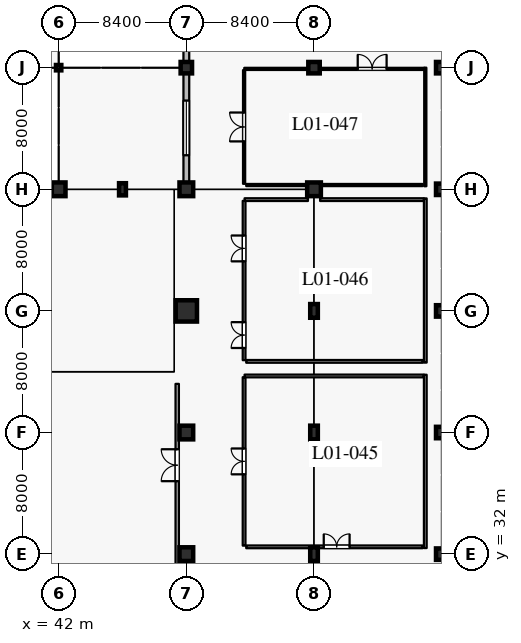
"""IFC4 building model, lengths in metres.
Left out: names, types, materials, properties, quantities, classifications, styles, units other than length and angle.
Written with IfcOpenShell. Run it as: python <this file> out.ifc"""

import sys

from ifc_helpers import new_model, si_unit, direction, frame, frame_2d, origin, origin_2d, place, context, subcontext, project, spatial, rectangle, hollow_rectangle, circle, extrude, element, fill, save


model = new_model("IFC4")
c1 = context("Model", 3, precision=1e-05, world=origin(), true_north=direction((0.0, 1.0)))
c2 = subcontext(c1, "Body", "Model", "MODEL_VIEW")
j1 = project(units=[si_unit("LENGTHUNIT", "METRE"), si_unit("PLANEANGLEUNIT", "RADIAN")], contexts=[c1])
p1 = place(None, origin())
s1 = spatial("IfcSite", under=j1, at=p1, CompositionType="ELEMENT")
p2 = place(p1, origin())
s2 = spatial("IfcBuilding", under=s1, at=p2, CompositionType="ELEMENT")
p3 = place(p2, frame((0.0, 0.0, 6.0)))
s3 = spatial("IfcBuildingStorey", under=s2, at=p3, CompositionType="ELEMENT", Elevation=6.0)
p4 = place(p3, frame((42.0, 56.0, 0.0), z_axis=(0.0, 0.0, 1.0), x_axis=(1.0, 0.0, 0.0)))
e1 = element("IfcColumn", 1, at=p4, inside=s3, PredefinedType="COLUMN", context=c2, shape_type="SweptSolid", body=[
    extrude(rectangle(XDim=0.9, YDim=0.9, at=origin_2d()), origin(), (0.0, 0.0, 1.0), 5.4),
])
p5 = place(p3, frame((42.0, 64.0, 0.0), z_axis=(0.0, 0.0, 1.0), x_axis=(1.0, 0.0, 0.0)))
e2 = element("IfcColumn", 2, at=p5, inside=s3, PredefinedType="COLUMN", context=c2, shape_type="SweptSolid", body=[
    extrude(hollow_rectangle(XDim=0.35, YDim=0.35, WallThickness=0.016, at=origin_2d()), origin(), (0.0, 0.0, 1.0), 5.4),
])
p6 = place(p3, frame((46.2, 56.0, 0.0), z_axis=(0.0, 0.0, 1.0), x_axis=(1.0, 0.0, 0.0)))
e3 = element("IfcColumn", 3, at=p6, inside=s3, PredefinedType="PILASTER", context=c2, shape_type="SweptSolid", body=[
    extrude(rectangle(XDim=0.45, YDim=0.8, at=origin_2d()), origin(), (0.0, 0.0, 1.0), 5.4),
])
for number, where, z_axis, x_axis in (
    (4, (50.4, 32.0, 0.0), (0.0, 0.0, 1.0), (1.0, 0.0, 0.0)),
    (5, (50.4, 40.0, 0.0), (0.0, 0.0, 1.0), (1.0, 0.0, 0.0)),
):
    element("IfcColumn", number, at=place(p3, frame(where, z_axis=z_axis, x_axis=x_axis)), inside=s3, PredefinedType="COLUMN", context=c2, shape_type="SweptSolid", body=[
        extrude(rectangle(XDim=0.9, YDim=0.9, at=origin_2d()), origin(), (0.0, 0.0, 1.0), 5.4),
    ])
p7 = place(p3, frame((50.4, 48.0, 0.0), z_axis=(0.0, 0.0, 1.0), x_axis=(1.0, 0.0, 0.0)))
e6 = element("IfcColumn", 6, at=p7, inside=s3, PredefinedType="COLUMN", context=c2, shape_type="SweptSolid", body=[
    extrude(circle(Radius=0.7, at=origin_2d()), origin(), (0.0, 0.0, 1.0), 5.4),
])
p8 = place(p3, frame((50.4, 56.0, 0.0), z_axis=(0.0, 0.0, 1.0), x_axis=(1.0, 0.0, 0.0)))
e7 = element("IfcColumn", 7, at=p8, inside=s3, PredefinedType="COLUMN", context=c2, shape_type="SweptSolid", body=[
    extrude(rectangle(XDim=0.9, YDim=0.9, at=origin_2d()), origin(), (0.0, 0.0, 1.0), 5.4),
])
p9 = place(p3, frame((50.4, 64.0, 0.0), z_axis=(0.0, 0.0, 1.0), x_axis=(1.0, 0.0, 0.0)))
e8 = element("IfcColumn", 8, at=p9, inside=s3, PredefinedType="COLUMN", context=c2, shape_type="SweptSolid", body=[
    extrude(rectangle(XDim=0.75, YDim=0.75, at=origin_2d()), origin(), (0.0, 0.0, 1.0), 5.4),
])
for number, where, z_axis, x_axis in (
    (9, (58.8, 32.0, 0.0), (0.0, 0.0, 1.0), (1.0, 0.0, 0.0)),
    (10, (58.8, 40.0, 0.0), (0.0, 0.0, 1.0), (1.0, 0.0, 0.0)),
    (11, (58.8, 48.0, 0.0), (0.0, 0.0, 1.0), (1.0, 0.0, 0.0)),
):
    element("IfcColumn", number, at=place(p3, frame(where, z_axis=z_axis, x_axis=x_axis)), inside=s3, PredefinedType="COLUMN", context=c2, shape_type="SweptSolid", body=[
        extrude(hollow_rectangle(XDim=0.5, YDim=0.9, WallThickness=0.024, at=origin_2d()), origin(), (0.0, 0.0, 1.0), 5.4),
    ])
p10 = place(p3, frame((58.8, 56.0, 0.0), z_axis=(0.0, 0.0, 1.0), x_axis=(1.0, 0.0, 0.0)))
e12 = element("IfcColumn", 12, at=p10, inside=s3, PredefinedType="COLUMN", context=c2, shape_type="SweptSolid", body=[
    extrude(rectangle(XDim=0.9, YDim=0.9, at=origin_2d()), origin(), (0.0, 0.0, 1.0), 5.4),
])
for number, where, z_axis, x_axis in (
    (13, (58.8, 64.0, 0.0), (0.0, 0.0, 1.0), (1.0, 0.0, 0.0)),
    (14, (67.2, 32.0, 0.0), (0.0, 0.0, 1.0), (1.0, 0.0, 0.0)),
    (15, (67.2, 40.0, 0.0), (0.0, 0.0, 1.0), (1.0, 0.0, 0.0)),
    (16, (67.2, 48.0, 0.0), (0.0, 0.0, 1.0), (1.0, 0.0, 0.0)),
    (17, (67.2, 56.0, 0.0), (0.0, 0.0, 1.0), (1.0, 0.0, 0.0)),
    (18, (67.2, 64.0, 0.0), (0.0, 0.0, 1.0), (1.0, 0.0, 0.0)),
):
    element("IfcColumn", number, at=place(p3, frame(where, z_axis=z_axis, x_axis=x_axis)), inside=s3, PredefinedType="COLUMN", context=c2, shape_type="SweptSolid", body=[
        extrude(rectangle(XDim=0.75, YDim=0.75, at=origin_2d()), origin(), (0.0, 0.0, 1.0), 5.4),
    ])
p11 = place(p3, frame((50.4, 56.45, 0.0), z_axis=(0.0, 0.0, 1.0), x_axis=(0.0, 1.0, 0.0)))
e19 = element("IfcWall", 19, at=p11, inside=s3, PredefinedType="SOLIDWALL", context=c2, shape_type="SweptSolid", body=[
    extrude(rectangle(XDim=7.175, YDim=0.38, at=frame_2d((3.587, 0.0))), origin(), (0.0, 0.0, 1.0), 4.67),
])
p12 = place(p11, frame((1.787, 0.0, 0.9)))
e20 = element("IfcOpeningElement", 20, at=p12, cuts=e19, PredefinedType="OPENING", context=c2, shape_type="SweptSolid", body=[
    extrude(rectangle(XDim=3.6, YDim=2.5, at=frame_2d((1.8, 1.25))), frame((0.0, 0.2, 0.0), z_axis=(0.0, -1.0, 0.0), x_axis=(1.0, 0.0, 0.0)), (0.0, 0.0, 1.0), 0.4),
])
p13 = place(p3, frame((50.4, 64.375, 0.0), z_axis=(0.0, 0.0, 1.0), x_axis=(0.0, 1.0, 0.0)))
e21 = element("IfcWall", 21, at=p13, inside=s3, PredefinedType="SOLIDWALL", context=c2, shape_type="SweptSolid", body=[
    extrude(rectangle(XDim=7.25, YDim=0.38, at=frame_2d((3.625, 0.0))), origin(), (0.0, 0.0, 1.0), 5.1),
])
p14 = place(p13, frame((1.825, 0.0, 0.9)))
e22 = element("IfcOpeningElement", 22, at=p14, cuts=e21, PredefinedType="OPENING", context=c2, shape_type="SweptSolid", body=[
    extrude(rectangle(XDim=3.6, YDim=2.5, at=frame_2d((1.8, 1.25))), frame((0.0, 0.2, 0.0), z_axis=(0.0, -1.0, 0.0), x_axis=(1.0, 0.0, 0.0)), (0.0, 0.0, 1.0), 0.4),
])
p15 = place(p3, frame((49.8, 9.2, 0.0), z_axis=(0.0, 0.0, 1.0), x_axis=(0.0, 1.0, 0.0)))
e23 = element("IfcWall", 23, at=p15, inside=s3, PredefinedType="PARTITIONING", context=c2, shape_type="SweptSolid", body=[
    extrude(rectangle(XDim=34.0, YDim=0.22, at=frame_2d((17.0, 0.0))), origin(), (0.0, 0.0, 1.0), 5.045),
])
p16 = place(p15, frame((1.75, 0.0, 0.0)))
e24 = element("IfcOpeningElement", 24, at=p16, cuts=e23, PredefinedType="OPENING", context=c2, shape_type="SweptSolid", body=[
    extrude(rectangle(XDim=2.1, YDim=2.5, at=frame_2d((1.05, 1.25))), frame((0.0, 0.12, 0.0), z_axis=(0.0, -1.0, 0.0), x_axis=(1.0, 0.0, 0.0)), (0.0, 0.0, 1.0), 0.24),
])
p17 = place(p15, frame((15.8, 0.0, 0.0)))
e25 = element("IfcOpeningElement", 25, at=p17, cuts=e23, PredefinedType="OPENING", context=c2, shape_type="SweptSolid", body=[
    extrude(rectangle(XDim=2.1, YDim=2.5, at=frame_2d((1.05, 1.25))), frame((0.0, 0.12, 0.0), z_axis=(0.0, -1.0, 0.0), x_axis=(1.0, 0.0, 0.0)), (0.0, 0.0, 1.0), 0.24),
])
p18 = place(p15, frame((27.6, 0.0, 0.0)))
e26 = element("IfcOpeningElement", 26, at=p18, cuts=e23, PredefinedType="OPENING", context=c2, shape_type="SweptSolid", body=[
    extrude(rectangle(XDim=2.1, YDim=2.5, at=frame_2d((1.05, 1.25))), frame((0.0, 0.12, 0.0), z_axis=(0.0, -1.0, 0.0), x_axis=(1.0, 0.0, 0.0)), (0.0, 0.0, 1.0), 0.24),
])
p19 = place(p3, frame((54.2, 32.56, 0.0), z_axis=(0.0, 0.0, 1.0), x_axis=(0.0, 1.0, 0.0)))
e27 = element("IfcWall", 27, at=p19, inside=s3, PredefinedType="PARTITIONING", context=c2, shape_type="SweptSolid", body=[
    extrude(rectangle(XDim=11.08, YDim=0.18, at=frame_2d((5.54, 0.0))), origin(), (0.0, 0.0, 1.0), 5.045),
])
p20 = place(p19, frame((4.69, 0.0, 0.0)))
e28 = element("IfcOpeningElement", 28, at=p20, cuts=e27, PredefinedType="OPENING", context=c2, shape_type="SweptSolid", body=[
    extrude(rectangle(XDim=1.7, YDim=2.3, at=frame_2d((0.85, 1.15))), frame((0.0, 0.1, 0.0), z_axis=(0.0, -1.0, 0.0), x_axis=(1.0, 0.0, 0.0)), (0.0, 0.0, 1.0), 0.2),
])
p21 = place(p3, frame((54.34, 32.48, 0.0), z_axis=(0.0, 0.0, 1.0), x_axis=(1.0, 0.0, 0.0)))
e29 = element("IfcWall", 29, at=p21, inside=s3, PredefinedType="PARTITIONING", context=c2, shape_type="SweptSolid", body=[
    extrude(rectangle(XDim=11.61, YDim=0.18, at=frame_2d((5.805, 0.0))), origin(), (0.0, 0.0, 1.0), 5.045),
])
p22 = place(p21, frame((5.1, 0.0, 0.0)))
e30 = element("IfcOpeningElement", 30, at=p22, cuts=e29, PredefinedType="OPENING", context=c2, shape_type="SweptSolid", body=[
    extrude(rectangle(XDim=1.7, YDim=2.3, at=frame_2d((0.85, 1.15))), frame((0.0, 0.1, 0.0), z_axis=(0.0, -1.0, 0.0), x_axis=(1.0, 0.0, 0.0)), (0.0, 0.0, 1.0), 0.2),
])
p23 = place(p3, frame((54.2, 44.76, 0.0), z_axis=(0.0, 0.0, 1.0), x_axis=(0.0, 1.0, 0.0)))
e31 = element("IfcWall", 31, at=p23, inside=s3, PredefinedType="PARTITIONING", context=c2, shape_type="SweptSolid", body=[
    extrude(rectangle(XDim=10.48, YDim=0.18, at=frame_2d((5.24, 0.0))), origin(), (0.0, 0.0, 1.0), 5.045),
])
p24 = place(p23, frame((0.8, 0.0, 0.0)))
e32 = element("IfcOpeningElement", 32, at=p24, cuts=e31, PredefinedType="OPENING", context=c2, shape_type="SweptSolid", body=[
    extrude(rectangle(XDim=1.7, YDim=2.3, at=frame_2d((0.85, 1.15))), frame((0.0, 0.1, 0.0), z_axis=(0.0, -1.0, 0.0), x_axis=(1.0, 0.0, 0.0)), (0.0, 0.0, 1.0), 0.2),
])
p25 = place(p23, frame((6.5, 0.0, 0.0)))
e33 = element("IfcOpeningElement", 33, at=p25, cuts=e31, PredefinedType="OPENING", context=c2, shape_type="SweptSolid", body=[
    extrude(rectangle(XDim=1.7, YDim=2.3, at=frame_2d((0.85, 1.15))), frame((0.0, 0.1, 0.0), z_axis=(0.0, -1.0, 0.0), x_axis=(1.0, 0.0, 0.0)), (0.0, 0.0, 1.0), 0.2),
])
p26 = place(p3, frame((54.34, 44.68, 0.0), z_axis=(0.0, 0.0, 1.0), x_axis=(1.0, 0.0, 0.0)))
e34 = element("IfcWall", 34, at=p26, inside=s3, PredefinedType="PARTITIONING", context=c2, shape_type="SweptSolid", body=[
    extrude(rectangle(XDim=11.61, YDim=0.18, at=frame_2d((5.805, 0.0))), origin(), (0.0, 0.0, 1.0), 5.045),
])
p27 = place(p3, frame((54.2, 56.36, 0.0), z_axis=(0.0, 0.0, 1.0), x_axis=(0.0, 1.0, 0.0)))
e35 = element("IfcWall", 35, at=p27, inside=s3, PredefinedType="PARTITIONING", context=c2, shape_type="SweptSolid", body=[
    extrude(rectangle(XDim=7.48, YDim=0.14, at=frame_2d((3.74, 0.0))), origin(), (0.0, 0.0, 1.0), 5.045),
])
p28 = place(p27, frame((2.79, 0.0, 0.0)))
e36 = element("IfcOpeningElement", 36, at=p28, cuts=e35, PredefinedType="OPENING", context=c2, shape_type="SweptSolid", body=[
    extrude(rectangle(XDim=1.9, YDim=2.4, at=frame_2d((0.95, 1.2))), frame((0.0, 0.08, 0.0), z_axis=(0.0, -1.0, 0.0), x_axis=(1.0, 0.0, 0.0)), (0.0, 0.0, 1.0), 0.16),
])
p29 = place(p3, frame((54.34, 56.28, 0.0), z_axis=(0.0, 0.0, 1.0), x_axis=(1.0, 0.0, 0.0)))
e37 = element("IfcWall", 37, at=p29, inside=s3, PredefinedType="PARTITIONING", context=c2, shape_type="SweptSolid", body=[
    extrude(rectangle(XDim=11.61, YDim=0.14, at=frame_2d((5.805, 0.0))), origin(), (0.0, 0.0, 1.0), 5.045),
])
p30 = place(p3, frame((66.12, 32.4, 0.0), z_axis=(0.0, 0.0, 1.0), x_axis=(0.0, 1.0, 0.0)))
e38 = element("IfcWall", 38, at=p30, inside=s3, PredefinedType="PARTITIONING", context=c2, shape_type="SweptSolid", body=[
    extrude(rectangle(XDim=11.4, YDim=0.18, at=frame_2d((5.7, 0.0))), origin(), (0.0, 0.0, 1.0), 5.045),
])
p31 = place(p3, frame((54.232, 43.72, 0.0), z_axis=(0.0, 0.0, 1.0), x_axis=(1.0, 0.0, 0.0)))
e39 = element("IfcWall", 39, at=p31, inside=s3, PredefinedType="PARTITIONING", context=c2, shape_type="SweptSolid", body=[
    extrude(rectangle(XDim=11.798, YDim=0.18, at=frame_2d((5.899, 0.0))), origin(), (0.0, 0.0, 1.0), 5.045),
])
p32 = place(p3, frame((66.12, 44.6, 0.0), z_axis=(0.0, 0.0, 1.0), x_axis=(0.0, 1.0, 0.0)))
e40 = element("IfcWall", 40, at=p32, inside=s3, PredefinedType="PARTITIONING", context=c2, shape_type="SweptSolid", body=[
    extrude(rectangle(XDim=10.8, YDim=0.18, at=frame_2d((5.4, 0.0))), origin(), (0.0, 0.0, 1.0), 5.045),
])
p33 = place(p3, frame((54.232, 55.32, 0.0), z_axis=(0.0, 0.0, 1.0), x_axis=(1.0, 0.0, 0.0)))
e41 = element("IfcWall", 41, at=p33, inside=s3, PredefinedType="PARTITIONING", context=c2, shape_type="SweptSolid", body=[
    extrude(rectangle(XDim=4.168, YDim=0.18, at=frame_2d((2.084, 0.0))), origin(), (0.0, 0.0, 1.0), 5.045),
])
p34 = place(p3, frame((59.2, 55.32, 0.0), z_axis=(0.0, 0.0, 1.0), x_axis=(1.0, 0.0, 0.0)))
e42 = element("IfcWall", 42, at=p34, inside=s3, PredefinedType="PARTITIONING", context=c2, shape_type="SweptSolid", body=[
    extrude(rectangle(XDim=6.83, YDim=0.18, at=frame_2d((3.415, 0.0))), origin(), (0.0, 0.0, 1.0), 5.045),
])
p35 = place(p3, frame((66.12, 56.2, 0.0), z_axis=(0.0, 0.0, 1.0), x_axis=(0.0, 1.0, 0.0)))
e43 = element("IfcWall", 43, at=p35, inside=s3, PredefinedType="PARTITIONING", context=c2, shape_type="SweptSolid", body=[
    extrude(rectangle(XDim=7.8, YDim=0.14, at=frame_2d((3.9, 0.0))), origin(), (0.0, 0.0, 1.0), 5.045),
])
p36 = place(p3, frame((54.212, 63.92, 0.0), z_axis=(0.0, 0.0, 1.0), x_axis=(1.0, 0.0, 0.0)))
e44 = element("IfcWall", 44, at=p36, inside=s3, PredefinedType="PARTITIONING", context=c2, shape_type="SweptSolid", body=[
    extrude(rectangle(XDim=4.213, YDim=0.14, at=frame_2d((2.106, 0.0))), origin(), (0.0, 0.0, 1.0), 5.045),
])
p37 = place(p3, frame((59.175, 63.92, 0.0), z_axis=(0.0, 0.0, 1.0), x_axis=(1.0, 0.0, 0.0)))
e45 = element("IfcWall", 45, at=p37, inside=s3, PredefinedType="PARTITIONING", context=c2, shape_type="SweptSolid", body=[
    extrude(rectangle(XDim=6.875, YDim=0.14, at=frame_2d((3.438, 0.0))), origin(), (0.0, 0.0, 1.0), 5.045),
])
p38 = place(p37, frame((2.5, 0.0, 0.0)))
e46 = element("IfcOpeningElement", 46, at=p38, cuts=e45, PredefinedType="OPENING", context=c2, shape_type="SweptSolid", body=[
    extrude(rectangle(XDim=1.9, YDim=2.4, at=frame_2d((0.95, 1.2))), frame((0.0, 0.08, 0.0), z_axis=(0.0, -1.0, 0.0), x_axis=(1.0, 0.0, 0.0)), (0.0, 0.0, 1.0), 0.16),
])
p39 = place(p12, origin())
e47 = element("IfcWindow", 47, at=p39, inside=s3, PartitioningType="DOUBLE_PANEL_VERTICAL", PredefinedType="WINDOW", context=c2, shape_type="SweptSolid", body=[
    extrude(rectangle(XDim=3.6, YDim=2.5, at=frame_2d((1.8, 1.25))), frame((0.0, 0.03, 0.0), z_axis=(0.0, -1.0, 0.0), x_axis=(1.0, 0.0, 0.0)), (0.0, 0.0, 1.0), 0.06),
])
fill(e20, e47)
p40 = place(p18, origin())
e48 = element("IfcDoor", 48, at=p40, inside=s3, OperationType="DOUBLE_DOOR_SINGLE_SWING", PredefinedType="DOOR", context=c2, shape_type="SweptSolid", body=[
    extrude(rectangle(XDim=2.1, YDim=2.5, at=frame_2d((1.05, 1.25))), frame((0.0, 0.025, 0.0), z_axis=(0.0, -1.0, 0.0), x_axis=(1.0, 0.0, 0.0)), (0.0, 0.0, 1.0), 0.05),
])
fill(e26, e48)
p41 = place(p20, origin())
e49 = element("IfcDoor", 49, at=p41, inside=s3, OperationType="DOUBLE_DOOR_SINGLE_SWING", PredefinedType="DOOR", context=c2, shape_type="SweptSolid", body=[
    extrude(rectangle(XDim=1.7, YDim=2.3, at=frame_2d((0.85, 1.15))), frame((0.0, 0.025, 0.0), z_axis=(0.0, -1.0, 0.0), x_axis=(1.0, 0.0, 0.0)), (0.0, 0.0, 1.0), 0.05),
])
fill(e28, e49)
p42 = place(p24, origin())
e50 = element("IfcDoor", 50, at=p42, inside=s3, OperationType="DOUBLE_DOOR_SINGLE_SWING", PredefinedType="DOOR", context=c2, shape_type="SweptSolid", body=[
    extrude(rectangle(XDim=1.7, YDim=2.3, at=frame_2d((0.85, 1.15))), frame((0.0, 0.025, 0.0), z_axis=(0.0, -1.0, 0.0), x_axis=(1.0, 0.0, 0.0)), (0.0, 0.0, 1.0), 0.05),
])
fill(e32, e50)
p43 = place(p28, origin())
e51 = element("IfcDoor", 51, at=p43, inside=s3, OperationType="DOUBLE_DOOR_SINGLE_SWING", PredefinedType="DOOR", context=c2, shape_type="SweptSolid", body=[
    extrude(rectangle(XDim=1.9, YDim=2.4, at=frame_2d((0.95, 1.2))), frame((0.0, 0.025, 0.0), z_axis=(0.0, -1.0, 0.0), x_axis=(1.0, 0.0, 0.0)), (0.0, 0.0, 1.0), 0.05),
])
fill(e36, e51)
p44 = place(p22, origin())
e52 = element("IfcDoor", 52, at=p44, inside=s3, OperationType="DOUBLE_DOOR_SINGLE_SWING", PredefinedType="DOOR", context=c2, shape_type="SweptSolid", body=[
    extrude(rectangle(XDim=1.7, YDim=2.3, at=frame_2d((0.85, 1.15))), frame((0.0, 0.025, 0.0), z_axis=(0.0, -1.0, 0.0), x_axis=(1.0, 0.0, 0.0)), (0.0, 0.0, 1.0), 0.05),
])
fill(e30, e52)
p45 = place(p25, origin())
e53 = element("IfcDoor", 53, at=p45, inside=s3, OperationType="DOUBLE_DOOR_SINGLE_SWING", PredefinedType="DOOR", context=c2, shape_type="SweptSolid", body=[
    extrude(rectangle(XDim=1.7, YDim=2.3, at=frame_2d((0.85, 1.15))), frame((0.0, 0.025, 0.0), z_axis=(0.0, -1.0, 0.0), x_axis=(1.0, 0.0, 0.0)), (0.0, 0.0, 1.0), 0.05),
])
fill(e33, e53)
p46 = place(p38, origin())
e54 = element("IfcDoor", 54, at=p46, inside=s3, OperationType="DOUBLE_DOOR_SINGLE_SWING", PredefinedType="DOOR", context=c2, shape_type="SweptSolid", body=[
    extrude(rectangle(XDim=1.9, YDim=2.4, at=frame_2d((0.95, 1.2))), frame((0.0, 0.025, 0.0), z_axis=(0.0, -1.0, 0.0), x_axis=(1.0, 0.0, 0.0)), (0.0, 0.0, 1.0), 0.05),
])
fill(e46, e54)
save(model, sys.argv[1])
